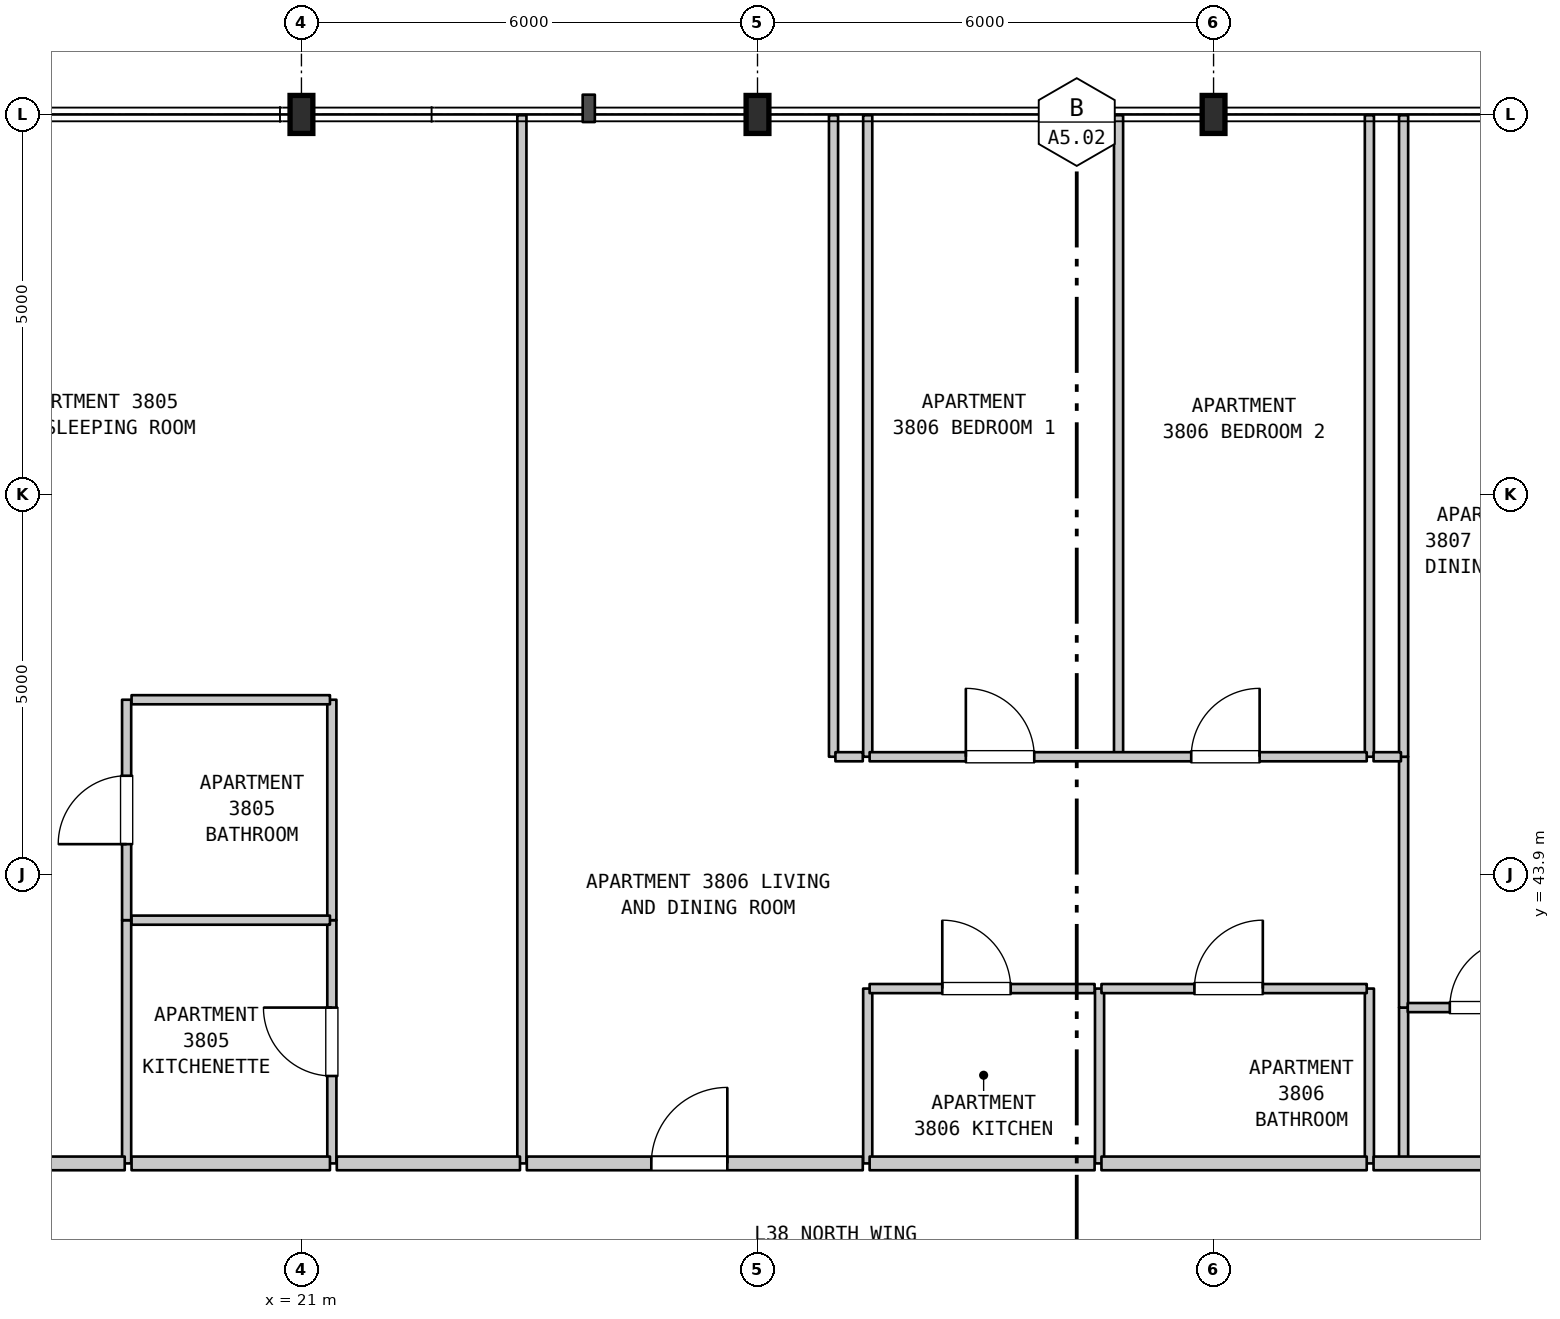
"""IFC4 building model, lengths in metres.
Left out: names, types, materials, properties, quantities, classifications, styles, units other than length and angle.
Written with IfcOpenShell. Run it as: python <this file> out.ifc"""

import sys

from ifc_helpers import new_model, si_unit, direction, frame, frame_2d, origin, origin_2d, place, context, subcontext, project, spatial, rectangle, i_section, extrude, element, fill, save


model = new_model("IFC4")
c1 = context("Model", 3, precision=1e-05, world=origin(), true_north=direction((0.0, 1.0)))
c2 = subcontext(c1, "Body", "Model", "MODEL_VIEW")
j1 = project(units=[si_unit("LENGTHUNIT", "METRE"), si_unit("PLANEANGLEUNIT", "RADIAN")], contexts=[c1])
p1 = place(None, origin())
s1 = spatial("IfcSite", under=j1, at=p1, CompositionType="ELEMENT")
p2 = place(p1, origin())
s2 = spatial("IfcBuilding", under=s1, at=p2, CompositionType="ELEMENT")
p3 = place(p2, frame((0.0, 0.0, 155.7)))
s3 = spatial("IfcBuildingStorey", under=s2, at=p3, CompositionType="ELEMENT", Elevation=155.7)
for number, where, z_axis, x_axis in (
    (1, (21.0, 53.9, 0.0), (0.0, 0.0, 1.0), (1.0, 0.0, 0.0)),
    (2, (27.0, 53.9, 0.0), (0.0, 0.0, 1.0), (1.0, 0.0, 0.0)),
    (3, (33.0, 53.9, 0.0), (0.0, 0.0, 1.0), (1.0, 0.0, 0.0)),
):
    element("IfcColumn", number, at=place(p3, frame(where, z_axis=z_axis, x_axis=x_axis)), inside=s3, PredefinedType="COLUMN", context=c2, shape_type="SweptSolid", body=[
        extrude(i_section(OverallWidth=0.3, OverallDepth=0.5, WebThickness=0.014, FlangeThickness=0.028, FilletRadius=0.027, at=origin_2d()), origin(), (0.0, 0.0, 1.0), 3.7),
    ])
p4 = place(p3, frame((18.7, 40.1, 0.0), z_axis=(0.0, 0.0, 1.0), x_axis=(0.0, 1.0, 0.0)))
e4 = element("IfcWall", 4, at=p4, inside=s3, PredefinedType="PARTITIONING", context=c2, shape_type="SweptSolid", body=[
    extrude(rectangle(XDim=3.2, YDim=0.12, at=frame_2d((1.6, 0.0))), origin(), (0.0, 0.0, 1.0), 3.28),
])
p5 = place(p3, frame((18.7, 43.3, 0.0), z_axis=(0.0, 0.0, 1.0), x_axis=(0.0, 1.0, 0.0)))
e5 = element("IfcWall", 5, at=p5, inside=s3, PredefinedType="PARTITIONING", context=c2, shape_type="SweptSolid", body=[
    extrude(rectangle(XDim=2.9, YDim=0.12, at=frame_2d((1.45, 0.0))), origin(), (0.0, 0.0, 1.0), 3.28),
])
p6 = place(p5, frame((1.0, 0.0, 0.0)))
e6 = element("IfcOpeningElement", 6, at=p6, cuts=e5, PredefinedType="OPENING", context=c2, shape_type="SweptSolid", body=[
    extrude(rectangle(XDim=0.9, YDim=2.1, at=frame_2d((0.45, 1.05))), frame((0.0, 0.07, 0.0), z_axis=(0.0, -1.0, 0.0), x_axis=(1.0, 0.0, 0.0)), (0.0, 0.0, 1.0), 0.14),
])
p7 = place(p3, frame((21.4, 40.1, 0.0), z_axis=(0.0, 0.0, 1.0), x_axis=(0.0, 1.0, 0.0)))
e7 = element("IfcWall", 7, at=p7, inside=s3, PredefinedType="PARTITIONING", context=c2, shape_type="SweptSolid", body=[
    extrude(rectangle(XDim=3.2, YDim=0.12, at=frame_2d((1.6, 0.0))), origin(), (0.0, 0.0, 1.0), 3.28),
])
p8 = place(p7, frame((1.15, 0.0, 0.0)))
e8 = element("IfcOpeningElement", 8, at=p8, cuts=e7, PredefinedType="OPENING", context=c2, shape_type="SweptSolid", body=[
    extrude(rectangle(XDim=0.9, YDim=2.15, at=frame_2d((0.45, 1.075))), frame((0.0, 0.07, 0.0), z_axis=(0.0, -1.0, 0.0), x_axis=(1.0, 0.0, 0.0)), (0.0, 0.0, 1.0), 0.14),
])
p9 = place(p3, frame((21.4, 43.3, 0.0), z_axis=(0.0, 0.0, 1.0), x_axis=(0.0, 1.0, 0.0)))
e9 = element("IfcWall", 9, at=p9, inside=s3, PredefinedType="PARTITIONING", context=c2, shape_type="SweptSolid", body=[
    extrude(rectangle(XDim=2.9, YDim=0.12, at=frame_2d((1.45, 0.0))), origin(), (0.0, 0.0, 1.0), 3.28),
])
p10 = place(p3, frame((23.9, 40.1, 0.0), z_axis=(0.0, 0.0, 1.0), x_axis=(0.0, 1.0, 0.0)))
e10 = element("IfcWall", 10, at=p10, inside=s3, PredefinedType="PARTITIONING", context=c2, shape_type="SweptSolid", body=[
    extrude(rectangle(XDim=13.79, YDim=0.12, at=frame_2d((6.895, 0.0))), origin(), (0.0, 0.0, 1.0), 3.28),
])
p11 = place(p3, frame((28.0, 45.45, 0.0), z_axis=(0.0, 0.0, 1.0), x_axis=(0.0, 1.0, 0.0)))
e11 = element("IfcWall", 11, at=p11, inside=s3, PredefinedType="PARTITIONING", context=c2, shape_type="SweptSolid", body=[
    extrude(rectangle(XDim=8.44, YDim=0.12, at=frame_2d((4.22, 0.0))), origin(), (0.0, 0.0, 1.0), 3.28),
])
p12 = place(p3, frame((28.45, 40.1, 0.0), z_axis=(0.0, 0.0, 1.0), x_axis=(0.0, 1.0, 0.0)))
e12 = element("IfcWall", 12, at=p12, inside=s3, PredefinedType="PARTITIONING", context=c2, shape_type="SweptSolid", body=[
    extrude(rectangle(XDim=2.3, YDim=0.12, at=frame_2d((1.15, 0.0))), origin(), (0.0, 0.0, 1.0), 3.28),
])
p13 = place(p3, frame((28.45, 45.45, 0.0), z_axis=(0.0, 0.0, 1.0), x_axis=(0.0, 1.0, 0.0)))
e13 = element("IfcWall", 13, at=p13, inside=s3, PredefinedType="PARTITIONING", context=c2, shape_type="SweptSolid", body=[
    extrude(rectangle(XDim=8.44, YDim=0.12, at=frame_2d((4.22, 0.0))), origin(), (0.0, 0.0, 1.0), 3.28),
])
p14 = place(p3, frame((31.5, 40.1, 0.0), z_axis=(0.0, 0.0, 1.0), x_axis=(0.0, 1.0, 0.0)))
e14 = element("IfcWall", 14, at=p14, inside=s3, PredefinedType="PARTITIONING", context=c2, shape_type="SweptSolid", body=[
    extrude(rectangle(XDim=2.3, YDim=0.12, at=frame_2d((1.15, 0.0))), origin(), (0.0, 0.0, 1.0), 3.28),
])
p15 = place(p3, frame((31.75, 45.45, 0.0), z_axis=(0.0, 0.0, 1.0), x_axis=(0.0, 1.0, 0.0)))
e15 = element("IfcWall", 15, at=p15, inside=s3, PredefinedType="PARTITIONING", context=c2, shape_type="SweptSolid", body=[
    extrude(rectangle(XDim=8.44, YDim=0.12, at=frame_2d((4.22, 0.0))), origin(), (0.0, 0.0, 1.0), 3.28),
])
p16 = place(p3, frame((35.05, 40.1, 0.0), z_axis=(0.0, 0.0, 1.0), x_axis=(0.0, 1.0, 0.0)))
e16 = element("IfcWall", 16, at=p16, inside=s3, PredefinedType="PARTITIONING", context=c2, shape_type="SweptSolid", body=[
    extrude(rectangle(XDim=2.3, YDim=0.12, at=frame_2d((1.15, 0.0))), origin(), (0.0, 0.0, 1.0), 3.28),
])
p17 = place(p3, frame((35.05, 45.45, 0.0), z_axis=(0.0, 0.0, 1.0), x_axis=(0.0, 1.0, 0.0)))
e17 = element("IfcWall", 17, at=p17, inside=s3, PredefinedType="PARTITIONING", context=c2, shape_type="SweptSolid", body=[
    extrude(rectangle(XDim=8.44, YDim=0.12, at=frame_2d((4.22, 0.0))), origin(), (0.0, 0.0, 1.0), 3.28),
])
p18 = place(p3, frame((35.5, 40.1, 0.0), z_axis=(0.0, 0.0, 1.0), x_axis=(0.0, 1.0, 0.0)))
e18 = element("IfcWall", 18, at=p18, inside=s3, PredefinedType="PARTITIONING", context=c2, shape_type="SweptSolid", body=[
    extrude(rectangle(XDim=2.05, YDim=0.12, at=frame_2d((1.025, 0.0))), origin(), (0.0, 0.0, 1.0), 3.28),
])
p19 = place(p3, frame((35.5, 42.15, 0.0), z_axis=(0.0, 0.0, 1.0), x_axis=(0.0, 1.0, 0.0)))
e19 = element("IfcWall", 19, at=p19, inside=s3, PredefinedType="PARTITIONING", context=c2, shape_type="SweptSolid", body=[
    extrude(rectangle(XDim=3.3, YDim=0.12, at=frame_2d((1.65, 0.0))), origin(), (0.0, 0.0, 1.0), 3.28),
])
p20 = place(p3, frame((35.5, 45.45, 0.0), z_axis=(0.0, 0.0, 1.0), x_axis=(0.0, 1.0, 0.0)))
e20 = element("IfcWall", 20, at=p20, inside=s3, PredefinedType="PARTITIONING", context=c2, shape_type="SweptSolid", body=[
    extrude(rectangle(XDim=8.44, YDim=0.12, at=frame_2d((4.22, 0.0))), origin(), (0.0, 0.0, 1.0), 3.28),
])
p21 = place(p3, frame((12.875, 40.1, 0.0), z_axis=(0.0, 0.0, 1.0), x_axis=(1.0, 0.0, 0.0)))
e21 = element("IfcWall", 21, at=p21, inside=s3, PredefinedType="STANDARD", context=c2, shape_type="SweptSolid", body=[
    extrude(rectangle(XDim=5.8, YDim=0.18, at=frame_2d((2.9, 0.0))), origin(), (0.0, 0.0, 1.0), 3.28),
])
p22 = place(p21, frame((2.314, 0.0, 0.0)))
e22 = element("IfcOpeningElement", 22, at=p22, cuts=e21, PredefinedType="OPENING", context=c2, shape_type="SweptSolid", body=[
    extrude(rectangle(XDim=1.0, YDim=2.15, at=frame_2d((0.5, 1.075))), frame((0.0, 0.1, 0.0), z_axis=(0.0, -1.0, 0.0), x_axis=(1.0, 0.0, 0.0)), (0.0, 0.0, 1.0), 0.2),
])
p23 = place(p3, frame((18.765, 40.1, 0.0), z_axis=(0.0, 0.0, 1.0), x_axis=(1.0, 0.0, 0.0)))
e23 = element("IfcWall", 23, at=p23, inside=s3, PredefinedType="STANDARD", context=c2, shape_type="SweptSolid", body=[
    extrude(rectangle(XDim=2.61, YDim=0.18, at=frame_2d((1.305, 0.0))), origin(), (0.0, 0.0, 1.0), 3.28),
])
p24 = place(p3, frame((21.465, 40.1, 0.0), z_axis=(0.0, 0.0, 1.0), x_axis=(1.0, 0.0, 0.0)))
e24 = element("IfcWall", 24, at=p24, inside=s3, PredefinedType="STANDARD", context=c2, shape_type="SweptSolid", body=[
    extrude(rectangle(XDim=2.41, YDim=0.18, at=frame_2d((1.205, 0.0))), origin(), (0.0, 0.0, 1.0), 3.28),
])
p25 = place(p3, frame((23.965, 40.1, 0.0), z_axis=(0.0, 0.0, 1.0), x_axis=(1.0, 0.0, 0.0)))
e25 = element("IfcWall", 25, at=p25, inside=s3, PredefinedType="STANDARD", context=c2, shape_type="SweptSolid", body=[
    extrude(rectangle(XDim=4.42, YDim=0.18, at=frame_2d((2.21, 0.0))), origin(), (0.0, 0.0, 1.0), 3.28),
])
p26 = place(p25, frame((1.638, 0.0, 0.0)))
e26 = element("IfcOpeningElement", 26, at=p26, cuts=e25, PredefinedType="OPENING", context=c2, shape_type="SweptSolid", body=[
    extrude(rectangle(XDim=1.0, YDim=2.15, at=frame_2d((0.5, 1.075))), frame((0.0, 0.1, 0.0), z_axis=(0.0, -1.0, 0.0), x_axis=(1.0, 0.0, 0.0)), (0.0, 0.0, 1.0), 0.2),
])
p27 = place(p3, frame((28.475, 40.1, 0.0), z_axis=(0.0, 0.0, 1.0), x_axis=(1.0, 0.0, 0.0)))
e27 = element("IfcWall", 27, at=p27, inside=s3, PredefinedType="STANDARD", context=c2, shape_type="SweptSolid", body=[
    extrude(rectangle(XDim=2.96, YDim=0.18, at=frame_2d((1.48, 0.0))), origin(), (0.0, 0.0, 1.0), 3.28),
])
p28 = place(p3, frame((31.525, 40.1, 0.0), z_axis=(0.0, 0.0, 1.0), x_axis=(1.0, 0.0, 0.0)))
e28 = element("IfcWall", 28, at=p28, inside=s3, PredefinedType="STANDARD", context=c2, shape_type="SweptSolid", body=[
    extrude(rectangle(XDim=3.49, YDim=0.18, at=frame_2d((1.745, 0.0))), origin(), (0.0, 0.0, 1.0), 3.28),
])
p29 = place(p3, frame((35.105, 40.1, 0.0), z_axis=(0.0, 0.0, 1.0), x_axis=(1.0, 0.0, 0.0)))
e29 = element("IfcWall", 29, at=p29, inside=s3, PredefinedType="STANDARD", context=c2, shape_type="SweptSolid", body=[
    extrude(rectangle(XDim=5.545, YDim=0.18, at=frame_2d((2.772, 0.0))), origin(), (0.0, 0.0, 1.0), 3.28),
])
p30 = place(p29, frame((2.305, 0.0, 0.0)))
e30 = element("IfcOpeningElement", 30, at=p30, cuts=e29, PredefinedType="OPENING", context=c2, shape_type="SweptSolid", body=[
    extrude(rectangle(XDim=1.0, YDim=2.15, at=frame_2d((0.5, 1.075))), frame((0.0, 0.1, 0.0), z_axis=(0.0, -1.0, 0.0), x_axis=(1.0, 0.0, 0.0)), (0.0, 0.0, 1.0), 0.2),
])
p31 = place(p3, frame((35.555, 42.15, 0.0), z_axis=(0.0, 0.0, 1.0), x_axis=(1.0, 0.0, 0.0)))
e31 = element("IfcWall", 31, at=p31, inside=s3, PredefinedType="PARTITIONING", context=c2, shape_type="SweptSolid", body=[
    extrude(rectangle(XDim=2.16, YDim=0.12, at=frame_2d((1.08, 0.0))), origin(), (0.0, 0.0, 1.0), 3.28),
])
p32 = place(p31, frame((0.553, 0.0, 0.0)))
e32 = element("IfcOpeningElement", 32, at=p32, cuts=e31, PredefinedType="OPENING", context=c2, shape_type="SweptSolid", body=[
    extrude(rectangle(XDim=0.9, YDim=2.15, at=frame_2d((0.45, 1.075))), frame((0.0, 0.07, 0.0), z_axis=(0.0, -1.0, 0.0), x_axis=(1.0, 0.0, 0.0)), (0.0, 0.0, 1.0), 0.14),
])
p33 = place(p3, frame((28.475, 42.4, 0.0), z_axis=(0.0, 0.0, 1.0), x_axis=(1.0, 0.0, 0.0)))
e33 = element("IfcWall", 33, at=p33, inside=s3, PredefinedType="PARTITIONING", context=c2, shape_type="SweptSolid", body=[
    extrude(rectangle(XDim=2.96, YDim=0.12, at=frame_2d((1.48, 0.0))), origin(), (0.0, 0.0, 1.0), 3.28),
])
p34 = place(p33, frame((0.956, 0.0, 0.0)))
e34 = element("IfcOpeningElement", 34, at=p34, cuts=e33, PredefinedType="OPENING", context=c2, shape_type="SweptSolid", body=[
    extrude(rectangle(XDim=0.9, YDim=2.15, at=frame_2d((0.45, 1.075))), frame((0.0, 0.07, 0.0), z_axis=(0.0, -1.0, 0.0), x_axis=(1.0, 0.0, 0.0)), (0.0, 0.0, 1.0), 0.14),
])
p35 = place(p3, frame((31.525, 42.4, 0.0), z_axis=(0.0, 0.0, 1.0), x_axis=(1.0, 0.0, 0.0)))
e35 = element("IfcWall", 35, at=p35, inside=s3, PredefinedType="PARTITIONING", context=c2, shape_type="SweptSolid", body=[
    extrude(rectangle(XDim=3.49, YDim=0.12, at=frame_2d((1.745, 0.0))), origin(), (0.0, 0.0, 1.0), 3.28),
])
p36 = place(p35, frame((1.223, 0.0, 0.0)))
e36 = element("IfcOpeningElement", 36, at=p36, cuts=e35, PredefinedType="OPENING", context=c2, shape_type="SweptSolid", body=[
    extrude(rectangle(XDim=0.9, YDim=2.1, at=frame_2d((0.45, 1.05))), frame((0.0, 0.07, 0.0), z_axis=(0.0, -1.0, 0.0), x_axis=(1.0, 0.0, 0.0)), (0.0, 0.0, 1.0), 0.14),
])
p37 = place(p3, frame((18.765, 43.3, 0.0), z_axis=(0.0, 0.0, 1.0), x_axis=(1.0, 0.0, 0.0)))
e37 = element("IfcWall", 37, at=p37, inside=s3, PredefinedType="PARTITIONING", context=c2, shape_type="SweptSolid", body=[
    extrude(rectangle(XDim=2.61, YDim=0.12, at=frame_2d((1.305, 0.0))), origin(), (0.0, 0.0, 1.0), 3.28),
])
p38 = place(p3, frame((28.025, 45.45, 0.0), z_axis=(0.0, 0.0, 1.0), x_axis=(1.0, 0.0, 0.0)))
e38 = element("IfcWall", 38, at=p38, inside=s3, PredefinedType="PARTITIONING", context=c2, shape_type="SweptSolid", body=[
    extrude(rectangle(XDim=0.36, YDim=0.12, at=frame_2d((0.18, 0.0))), origin(), (0.0, 0.0, 1.0), 3.28),
])
p39 = place(p3, frame((28.475, 45.45, 0.0), z_axis=(0.0, 0.0, 1.0), x_axis=(1.0, 0.0, 0.0)))
e39 = element("IfcWall", 39, at=p39, inside=s3, PredefinedType="PARTITIONING", context=c2, shape_type="SweptSolid", body=[
    extrude(rectangle(XDim=6.54, YDim=0.12, at=frame_2d((3.27, 0.0))), origin(), (0.0, 0.0, 1.0), 3.28),
])
p40 = place(p39, frame((1.266, 0.0, 0.0)))
e40 = element("IfcOpeningElement", 40, at=p40, cuts=e39, PredefinedType="OPENING", context=c2, shape_type="SweptSolid", body=[
    extrude(rectangle(XDim=0.9, YDim=2.15, at=frame_2d((0.45, 1.075))), frame((0.0, 0.07, 0.0), z_axis=(0.0, -1.0, 0.0), x_axis=(1.0, 0.0, 0.0)), (0.0, 0.0, 1.0), 0.14),
])
p41 = place(p39, frame((4.231, 0.0, 0.0)))
e41 = element("IfcOpeningElement", 41, at=p41, cuts=e39, PredefinedType="OPENING", context=c2, shape_type="SweptSolid", body=[
    extrude(rectangle(XDim=0.9, YDim=2.15, at=frame_2d((0.45, 1.075))), frame((0.0, 0.07, 0.0), z_axis=(0.0, -1.0, 0.0), x_axis=(1.0, 0.0, 0.0)), (0.0, 0.0, 1.0), 0.14),
])
p42 = place(p3, frame((35.105, 45.45, 0.0), z_axis=(0.0, 0.0, 1.0), x_axis=(1.0, 0.0, 0.0)))
e42 = element("IfcWall", 42, at=p42, inside=s3, PredefinedType="PARTITIONING", context=c2, shape_type="SweptSolid", body=[
    extrude(rectangle(XDim=0.36, YDim=0.12, at=frame_2d((0.18, 0.0))), origin(), (0.0, 0.0, 1.0), 3.28),
])
p43 = place(p3, frame((18.765, 46.2, 0.0), z_axis=(0.0, 0.0, 1.0), x_axis=(1.0, 0.0, 0.0)))
e43 = element("IfcWall", 43, at=p43, inside=s3, PredefinedType="PARTITIONING", context=c2, shape_type="SweptSolid", body=[
    extrude(rectangle(XDim=2.61, YDim=0.12, at=frame_2d((1.305, 0.0))), origin(), (0.0, 0.0, 1.0), 3.28),
])
p44 = place(p6, origin())
e44 = element("IfcDoor", 44, at=p44, inside=s3, OperationType="SINGLE_SWING_LEFT", PredefinedType="DOOR", context=c2, shape_type="SweptSolid", body=[
    extrude(rectangle(XDim=0.9, YDim=2.1, at=frame_2d((0.45, 1.05))), frame((0.0, 0.025, 0.0), z_axis=(0.0, -1.0, 0.0), x_axis=(1.0, 0.0, 0.0)), (0.0, 0.0, 1.0), 0.05),
])
fill(e6, e44)
p45 = place(p8, origin())
e45 = element("IfcDoor", 45, at=p45, inside=s3, OperationType="SINGLE_SWING_RIGHT", PredefinedType="DOOR", context=c2, shape_type="SweptSolid", body=[
    extrude(rectangle(XDim=0.9, YDim=2.15, at=frame_2d((0.45, 1.075))), frame((0.0, 0.025, 0.0), z_axis=(0.0, -1.0, 0.0), x_axis=(1.0, 0.0, 0.0)), (0.0, 0.0, 1.0), 0.05),
])
fill(e8, e45)
p46 = place(p26, origin())
e46 = element("IfcDoor", 46, at=p46, inside=s3, OperationType="SINGLE_SWING_RIGHT", PredefinedType="DOOR", context=c2, shape_type="SweptSolid", body=[
    extrude(rectangle(XDim=1.0, YDim=2.15, at=frame_2d((0.5, 1.075))), frame((0.0, 0.025, 0.0), z_axis=(0.0, -1.0, 0.0), x_axis=(1.0, 0.0, 0.0)), (0.0, 0.0, 1.0), 0.05),
])
fill(e26, e46)
p47 = place(p32, origin())
e47 = element("IfcDoor", 47, at=p47, inside=s3, OperationType="SINGLE_SWING_RIGHT", PredefinedType="DOOR", context=c2, shape_type="SweptSolid", body=[
    extrude(rectangle(XDim=0.9, YDim=2.15, at=frame_2d((0.45, 1.075))), frame((0.0, 0.025, 0.0), z_axis=(0.0, -1.0, 0.0), x_axis=(1.0, 0.0, 0.0)), (0.0, 0.0, 1.0), 0.05),
])
fill(e32, e47)
p48 = place(p34, origin())
e48 = element("IfcDoor", 48, at=p48, inside=s3, OperationType="SINGLE_SWING_LEFT", PredefinedType="DOOR", context=c2, shape_type="SweptSolid", body=[
    extrude(rectangle(XDim=0.9, YDim=2.15, at=frame_2d((0.45, 1.075))), frame((0.0, 0.025, 0.0), z_axis=(0.0, -1.0, 0.0), x_axis=(1.0, 0.0, 0.0)), (0.0, 0.0, 1.0), 0.05),
])
fill(e34, e48)
p49 = place(p36, origin())
e49 = element("IfcDoor", 49, at=p49, inside=s3, OperationType="SINGLE_SWING_RIGHT", PredefinedType="DOOR", context=c2, shape_type="SweptSolid", body=[
    extrude(rectangle(XDim=0.9, YDim=2.1, at=frame_2d((0.45, 1.05))), frame((0.0, 0.025, 0.0), z_axis=(0.0, -1.0, 0.0), x_axis=(1.0, 0.0, 0.0)), (0.0, 0.0, 1.0), 0.05),
])
fill(e36, e49)
p50 = place(p40, origin())
e50 = element("IfcDoor", 50, at=p50, inside=s3, OperationType="SINGLE_SWING_LEFT", PredefinedType="DOOR", context=c2, shape_type="SweptSolid", body=[
    extrude(rectangle(XDim=0.9, YDim=2.15, at=frame_2d((0.45, 1.075))), frame((0.0, 0.025, 0.0), z_axis=(0.0, -1.0, 0.0), x_axis=(1.0, 0.0, 0.0)), (0.0, 0.0, 1.0), 0.05),
])
fill(e40, e50)
p51 = place(p41, origin())
e51 = element("IfcDoor", 51, at=p51, inside=s3, OperationType="SINGLE_SWING_RIGHT", PredefinedType="DOOR", context=c2, shape_type="SweptSolid", body=[
    extrude(rectangle(XDim=0.9, YDim=2.15, at=frame_2d((0.45, 1.075))), frame((0.0, 0.025, 0.0), z_axis=(0.0, -1.0, 0.0), x_axis=(1.0, 0.0, 0.0)), (0.0, 0.0, 1.0), 0.05),
])
fill(e41, e51)
save(model, sys.argv[1])
